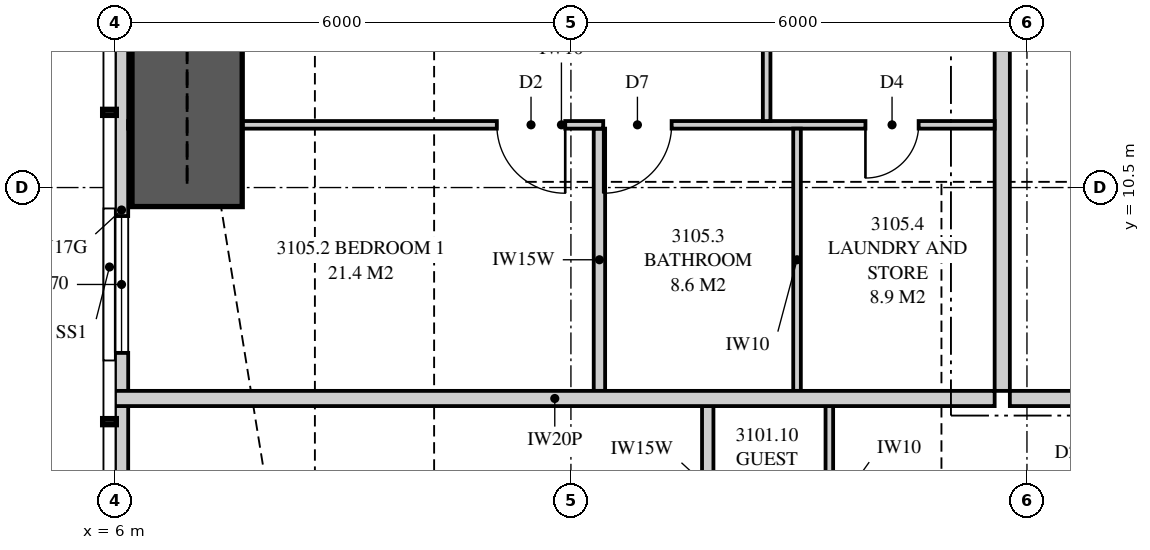
"""IFC4 building model, lengths in metres.
Left out: names, types, materials, properties, quantities, classifications, styles, units other than length and angle.
Written with IfcOpenShell. Run it as: python <this file> out.ifc"""

import sys

from ifc_helpers import new_model, si_unit, direction, frame, frame_2d, origin, place, context, subcontext, project, spatial, polyline, rectangle, outline, extrude, element, fill, save


model = new_model("IFC4")
c1 = context("Model", 3, precision=1e-05, world=origin(), true_north=direction((0.0, 1.0)))
c2 = subcontext(c1, "Body", "Model", "MODEL_VIEW")
j1 = project(units=[si_unit("LENGTHUNIT", "METRE"), si_unit("PLANEANGLEUNIT", "RADIAN")], contexts=[c1])
p1 = place(None, origin())
s1 = spatial("IfcSite", under=j1, at=p1, CompositionType="ELEMENT")
p2 = place(p1, origin())
s2 = spatial("IfcBuilding", under=s1, at=p2, CompositionType="ELEMENT")
p3 = place(p2, frame((0.0, 0.0, 114.9)))
s3 = spatial("IfcBuildingStorey", under=s2, at=p3, CompositionType="ELEMENT", Elevation=114.9)
p4 = place(p3, frame((6.087, 17.358, 0.0), z_axis=(0.0, 0.0, 1.0), x_axis=(0.0, -1.0, 0.0)))
e1 = element("IfcWall", 1, at=p4, inside=s3, PredefinedType="SOLIDWALL", context=c2, shape_type="SweptSolid", body=[
    extrude(outline(polyline([(0.0, 0.0), (14.307, 0.0), (14.307, 3.11), (4.577, 3.11), (4.577, 2.15), (4.484, 2.15), (4.484, 3.11), (4.358, 3.11), (4.358, 2.15), (0.0, 2.15), (0.0, 0.0)])), frame((0.0, 0.087, 0.0), z_axis=(0.0, -1.0, 0.0), x_axis=(1.0, 0.0, 0.0)), (0.0, 0.0, 1.0), 0.175),
])
p5 = place(p4, frame((0.3, 0.0, 0.4)))
e2 = element("IfcOpeningElement", 2, at=p5, cuts=e1, PredefinedType="OPENING", context=c2, shape_type="SweptSolid", body=[
    extrude(rectangle(XDim=1.2, YDim=1.7, at=frame_2d((0.6, 0.85))), frame((0.0, 0.097, 0.0), z_axis=(0.0, -1.0, 0.0), x_axis=(1.0, 0.0, 0.0)), (0.0, 0.0, 1.0), 0.195),
])
p6 = place(p4, frame((7.233, 0.0, 0.4)))
e3 = element("IfcOpeningElement", 3, at=p6, cuts=e1, PredefinedType="OPENING", context=c2, shape_type="SweptSolid", body=[
    extrude(rectangle(XDim=1.8, YDim=1.7, at=frame_2d((0.9, 0.85))), frame((0.0, 0.097, 0.0), z_axis=(0.0, -1.0, 0.0), x_axis=(1.0, 0.0, 0.0)), (0.0, 0.0, 1.0), 0.195),
])
p7 = place(p3, frame((17.775, 7.725, 0.0), z_axis=(0.0, 0.0, 1.0), x_axis=(1.0, 0.0, 0.0)))
e4 = element("IfcWall", 4, at=p7, inside=s3, PredefinedType="PARTITIONING", context=c2, shape_type="SweptSolid", body=[
    extrude(outline(polyline([(0.0, 0.0), (19.225, 0.0), (19.225, 3.11), (10.312, 3.11), (10.312, 2.541), (9.638, 2.541), (9.638, 3.11), (0.0, 3.11), (0.0, 0.0)])), frame((0.0, 0.1, 0.0), z_axis=(0.0, -1.0, 0.0), x_axis=(1.0, 0.0, 0.0)), (0.0, 0.0, 1.0), 0.2),
])
p8 = place(p7, frame((3.275, 0.0, 0.0)))
e5 = element("IfcOpeningElement", 5, at=p8, cuts=e4, PredefinedType="OPENING", context=c2, shape_type="SweptSolid", body=[
    extrude(rectangle(XDim=1.05, YDim=2.2, at=frame_2d((0.525, 1.1))), frame((0.0, 0.11, 0.0), z_axis=(0.0, -1.0, 0.0), x_axis=(1.0, 0.0, 0.0)), (0.0, 0.0, 1.0), 0.22),
])
p9 = place(p3, frame((15.4, 4.675, 0.0), z_axis=(0.0, 0.0, 1.0), x_axis=(0.0, 1.0, 0.0)))
e6 = element("IfcWall", 6, at=p9, inside=s3, PredefinedType="PARTITIONING", context=c2, shape_type="SweptSolid", body=[
    extrude(rectangle(XDim=2.95, YDim=0.1, at=frame_2d((1.475, 0.0))), origin(), (0.0, 0.0, 1.0), 3.11),
])
p10 = place(p3, frame((13.8, 5.5, 0.0), z_axis=(0.0, 0.0, 1.0), x_axis=(0.0, 1.0, 0.0)))
e7 = element("IfcWall", 7, at=p10, inside=s3, PredefinedType="PLUMBINGWALL", context=c2, shape_type="SweptSolid", body=[
    extrude(rectangle(XDim=2.125, YDim=0.15, at=frame_2d((1.062, 0.0))), origin(), (0.0, 0.0, 1.0), 3.11),
])
p11 = place(p3, frame((6.0, 7.725, 0.0), z_axis=(0.0, 0.0, 1.0), x_axis=(1.0, 0.0, 0.0)))
e8 = element("IfcWall", 8, at=p11, inside=s3, PredefinedType="PARTITIONING", context=c2, shape_type="SweptSolid", body=[
    extrude(outline(polyline([(0.0, 0.0), (11.575, 0.0), (11.575, 3.11), (11.212, 3.11), (11.212, 2.541), (10.538, 2.541), (10.538, 3.11), (5.51, 3.11), (5.51, 2.51), (2.969, 2.51), (2.969, 2.541), (2.727, 2.541), (2.727, 2.15), (0.884, 2.15), (0.884, 3.11), (0.0, 3.11), (0.0, 0.0)])), frame((0.0, 0.1, 0.0), z_axis=(0.0, -1.0, 0.0), x_axis=(1.0, 0.0, 0.0)), (0.0, 0.0, 1.0), 0.2),
])
p12 = place(p3, frame((17.675, 7.825, 0.0), z_axis=(0.0, 0.0, 1.0), x_axis=(0.0, 1.0, 0.0)))
e9 = element("IfcWall", 9, at=p12, inside=s3, PredefinedType="PARTITIONING", context=c2, shape_type="SweptSolid", body=[
    extrude(outline(polyline([(0.0, 0.0), (9.075, 0.0), (9.075, 3.11), (3.087, 3.11), (3.087, 2.541), (2.413, 2.541), (2.413, 3.11), (0.0, 3.11), (0.0, 0.0)])), frame((0.0, 0.1, 0.0), z_axis=(0.0, -1.0, 0.0), x_axis=(1.0, 0.0, 0.0)), (0.0, 0.0, 1.0), 0.2),
])
p13 = place(p3, frame((6.175, 11.325, 0.0), z_axis=(0.0, 0.0, 1.0), x_axis=(1.0, 0.0, 0.0)))
e10 = element("IfcWall", 10, at=p13, inside=s3, PredefinedType="PARTITIONING", context=c2, shape_type="SweptSolid", body=[
    extrude(outline(polyline([(0.175, 3.11), (0.0, 3.11), (0.0, 0.0), (0.529, 0.0), (0.529, 0.325), (1.021, 0.325), (1.021, 0.0), (11.4, 0.0), (11.4, 3.11), (5.285, 3.11), (5.285, 2.51), (2.765, 2.51), (2.765, 3.11), (2.744, 3.11), (2.744, 2.541), (2.169, 2.541), (2.169, 3.11), (1.918, 3.11), (1.918, 2.15), (1.021, 2.15), (1.021, 1.825), (0.529, 1.825), (0.529, 2.15), (0.175, 2.15), (0.175, 3.11)])), frame((0.0, 0.05, 0.0), z_axis=(0.0, -1.0, 0.0), x_axis=(1.0, 0.0, 0.0)), (0.0, 0.0, 1.0), 0.1),
])
p14 = place(p13, frame((4.85, 0.0, 0.0)))
e11 = element("IfcOpeningElement", 11, at=p14, cuts=e10, PredefinedType="OPENING", context=c2, shape_type="SweptSolid", body=[
    extrude(rectangle(XDim=0.9, YDim=2.1, at=frame_2d((0.45, 1.05))), frame((0.0, 0.06, 0.0), z_axis=(0.0, -1.0, 0.0), x_axis=(1.0, 0.0, 0.0)), (0.0, 0.0, 1.0), 0.12),
])
p15 = place(p13, frame((6.25, 0.0, 0.0)))
e12 = element("IfcOpeningElement", 12, at=p15, cuts=e10, PredefinedType="OPENING", context=c2, shape_type="SweptSolid", body=[
    extrude(rectangle(XDim=0.9, YDim=2.1, at=frame_2d((0.45, 1.05))), frame((0.0, 0.06, 0.0), z_axis=(0.0, -1.0, 0.0), x_axis=(1.0, 0.0, 0.0)), (0.0, 0.0, 1.0), 0.12),
])
p16 = place(p13, frame((9.7, 0.0, 0.0)))
e13 = element("IfcOpeningElement", 13, at=p16, cuts=e10, PredefinedType="OPENING", context=c2, shape_type="SweptSolid", body=[
    extrude(rectangle(XDim=0.7, YDim=2.1, at=frame_2d((0.35, 1.05))), frame((0.0, 0.06, 0.0), z_axis=(0.0, -1.0, 0.0), x_axis=(1.0, 0.0, 0.0)), (0.0, 0.0, 1.0), 0.12),
])
p17 = place(p3, frame((12.375, 7.825, 0.0), z_axis=(0.0, 0.0, 1.0), x_axis=(0.0, 1.0, 0.0)))
e14 = element("IfcWall", 14, at=p17, inside=s3, PredefinedType="PLUMBINGWALL", context=c2, shape_type="SweptSolid", body=[
    extrude(outline(polyline([(0.0, 0.0), (3.45, 0.0), (3.45, 3.11), (3.062, 3.11), (3.062, 2.541), (2.438, 2.541), (2.438, 3.11), (0.0, 3.11), (0.0, 0.0)])), frame((0.0, 0.075, 0.0), z_axis=(0.0, -1.0, 0.0), x_axis=(1.0, 0.0, 0.0)), (0.0, 0.0, 1.0), 0.15),
])
p18 = place(p3, frame((14.975, 7.825, 0.0), z_axis=(0.0, 0.0, 1.0), x_axis=(0.0, 1.0, 0.0)))
e15 = element("IfcWall", 15, at=p18, inside=s3, PredefinedType="PARTITIONING", context=c2, shape_type="SweptSolid", body=[
    extrude(outline(polyline([(0.0, 0.0), (3.45, 0.0), (3.45, 3.11), (3.037, 3.11), (3.037, 2.541), (2.463, 2.541), (2.463, 3.11), (0.0, 3.11), (0.0, 0.0)])), frame((0.0, 0.05, 0.0), z_axis=(0.0, -1.0, 0.0), x_axis=(1.0, 0.0, 0.0)), (0.0, 0.0, 1.0), 0.1),
])
p19 = place(p3, frame((14.575, 11.375, 0.0), z_axis=(0.0, 0.0, 1.0), x_axis=(0.0, 1.0, 0.0)))
e16 = element("IfcWall", 16, at=p19, inside=s3, PredefinedType="PARTITIONING", context=c2, shape_type="SweptSolid", body=[
    extrude(rectangle(XDim=3.55, YDim=0.1, at=frame_2d((1.775, 0.0))), origin(), (0.0, 0.0, 1.0), 3.11),
])
p20 = place(p19, frame((1.35, 0.0, 0.0)))
e17 = element("IfcOpeningElement", 17, at=p20, cuts=e16, PredefinedType="OPENING", context=c2, shape_type="SweptSolid", body=[
    extrude(rectangle(XDim=0.9, YDim=2.1, at=frame_2d((0.45, 1.05))), frame((0.0, 0.06, 0.0), z_axis=(0.0, -1.0, 0.0), x_axis=(1.0, 0.0, 0.0)), (0.0, 0.0, 1.0), 0.12),
])
p21 = place(p3, frame((6.95, 10.25, 0.0), z_axis=(0.0, 0.0, 1.0), x_axis=(0.0, 1.0, 0.0)))
e18 = element("IfcWall", 18, at=p21, inside=s3, PredefinedType="SHEAR", context=c2, shape_type="SweptSolid", body=[
    extrude(rectangle(XDim=5.5, YDim=1.45, at=frame_2d((2.75, 0.0))), origin(), (0.0, 0.0, 1.0), 3.35),
])
p22 = place(p6, origin())
e19 = element("IfcWindow", 19, at=p22, inside=s3, PartitioningType="SINGLE_PANEL", PredefinedType="WINDOW", context=c2, shape_type="SweptSolid", body=[
    extrude(rectangle(XDim=1.8, YDim=1.7, at=frame_2d((0.9, 0.85))), frame((0.0, 0.03, 0.0), z_axis=(0.0, -1.0, 0.0), x_axis=(1.0, 0.0, 0.0)), (0.0, 0.0, 1.0), 0.06),
])
fill(e3, e19)
p23 = place(p14, frame((0.9, 0.0, 0.0), z_axis=(0.0, 0.0, 1.0), x_axis=(-1.0, 0.0, 0.0)))
e20 = element("IfcDoor", 20, at=p23, inside=s3, OperationType="SINGLE_SWING_LEFT", PredefinedType="DOOR", context=c2, shape_type="SweptSolid", body=[
    extrude(rectangle(XDim=0.9, YDim=2.1, at=frame_2d((0.45, 1.05))), frame((0.0, 0.025, 0.0), z_axis=(0.0, -1.0, 0.0), x_axis=(1.0, 0.0, 0.0)), (0.0, 0.0, 1.0), 0.05),
])
fill(e11, e20)
p24 = place(p15, frame((0.9, 0.0, 0.0), z_axis=(0.0, 0.0, 1.0), x_axis=(-1.0, 0.0, 0.0)))
e21 = element("IfcDoor", 21, at=p24, inside=s3, OperationType="SINGLE_SWING_RIGHT", PredefinedType="DOOR", context=c2, shape_type="SweptSolid", body=[
    extrude(rectangle(XDim=0.9, YDim=2.1, at=frame_2d((0.45, 1.05))), frame((0.0, 0.025, 0.0), z_axis=(0.0, -1.0, 0.0), x_axis=(1.0, 0.0, 0.0)), (0.0, 0.0, 1.0), 0.05),
])
fill(e12, e21)
p25 = place(p16, frame((0.7, 0.0, 0.0), z_axis=(0.0, 0.0, 1.0), x_axis=(-1.0, 0.0, 0.0)))
e22 = element("IfcDoor", 22, at=p25, inside=s3, OperationType="SINGLE_SWING_RIGHT", PredefinedType="DOOR", context=c2, shape_type="SweptSolid", body=[
    extrude(rectangle(XDim=0.7, YDim=2.1, at=frame_2d((0.35, 1.05))), frame((0.0, 0.025, 0.0), z_axis=(0.0, -1.0, 0.0), x_axis=(1.0, 0.0, 0.0)), (0.0, 0.0, 1.0), 0.05),
])
fill(e13, e22)
save(model, sys.argv[1])
